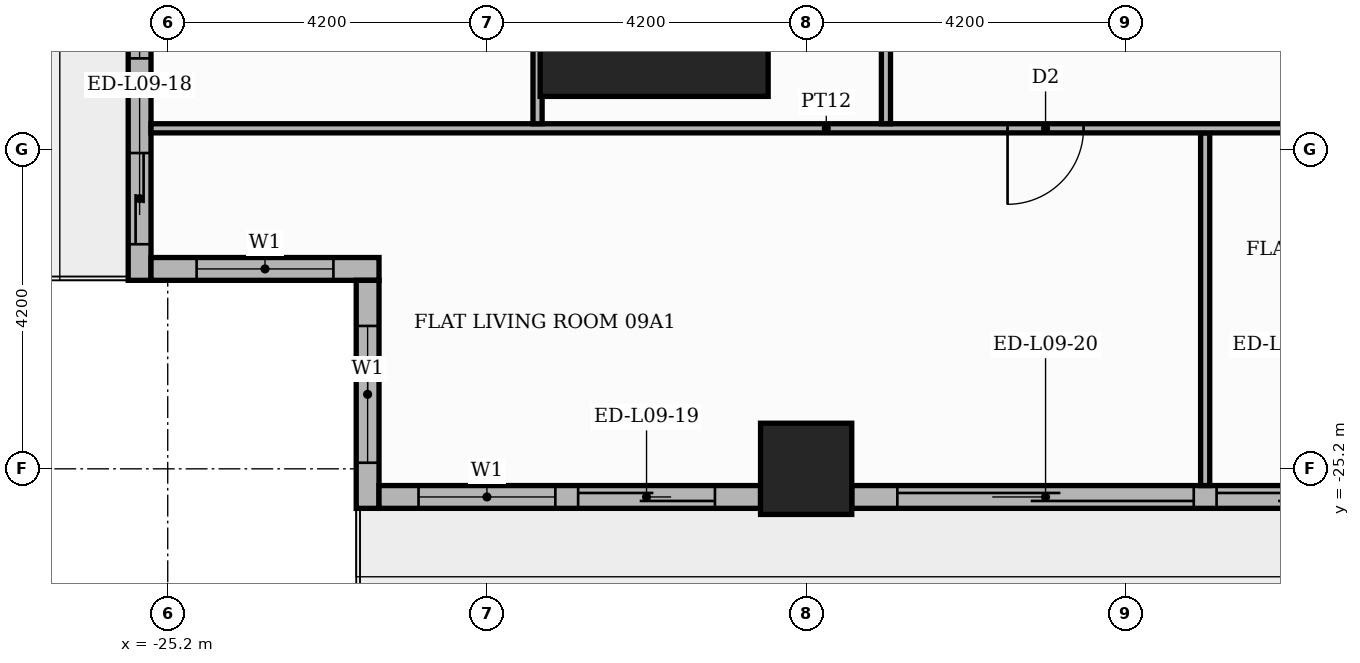
"""IFC4 building model, lengths in metres.
Left out: names, types, materials, properties, quantities, classifications, styles, units other than length and angle.
Written with IfcOpenShell. Run it as: python <this file> out.ifc"""

import sys

from ifc_helpers import new_model, si_unit, direction, frame, frame_2d, origin, origin_2d, place, context, subcontext, project, spatial, rectangle, extrude, element, fill, save


model = new_model("IFC4")
c1 = context("Model", 3, precision=1e-05, world=origin(), true_north=direction((0.0, 1.0)))
c2 = subcontext(c1, "Body", "Model", "MODEL_VIEW")
j1 = project(units=[si_unit("LENGTHUNIT", "METRE"), si_unit("PLANEANGLEUNIT", "RADIAN")], contexts=[c1])
p1 = place(None, origin())
s1 = spatial("IfcSite", under=j1, at=p1, CompositionType="ELEMENT")
p2 = place(p1, origin())
s2 = spatial("IfcBuilding", under=s1, at=p2, CompositionType="ELEMENT")
p3 = place(p2, frame((0.0, 0.0, 42.6)))
s3 = spatial("IfcBuildingStorey", under=s2, at=p3, CompositionType="ELEMENT", Elevation=42.6)
p4 = place(p3, frame((-18.8, -18.8, 0.0), z_axis=(0.0, 0.0, 1.0), x_axis=(1.0, 0.0, 0.0)))
e1 = element("IfcColumn", 1, at=p4, inside=s3, PredefinedType="COLUMN", context=c2, shape_type="SweptSolid", body=[
    extrude(rectangle(XDim=3.0, YDim=3.0, at=origin_2d()), origin(), (0.0, 0.0, 1.0), 3.9),
])
p5 = place(p3, frame((-16.8, -25.2, 0.0), z_axis=(0.0, 0.0, 1.0), x_axis=(1.0, 0.0, 0.0)))
e2 = element("IfcColumn", 2, at=p5, inside=s3, PredefinedType="COLUMN", context=c2, shape_type="SweptSolid", body=[
    extrude(rectangle(XDim=1.2, YDim=1.2, at=origin_2d()), origin(), (0.0, 0.0, 1.0), 3.9),
])
p6 = place(p3, frame((-25.57, -17.4, 0.0), z_axis=(0.0, 0.0, 1.0), x_axis=(0.0, -1.0, 0.0)))
e3 = element("IfcWall", 3, at=p6, inside=s3, PredefinedType="STANDARD", context=c2, shape_type="SweptSolid", body=[
    extrude(rectangle(XDim=5.32, YDim=0.3, at=frame_2d((2.66, 0.0))), origin(), (0.0, 0.0, 1.0), 3.48),
])
p7 = place(p6, frame((0.6, 0.0, 0.9)))
e4 = element("IfcOpeningElement", 4, at=p7, cuts=e3, PredefinedType="OPENING", context=c2, shape_type="SweptSolid", body=[
    extrude(rectangle(XDim=1.8, YDim=2.1, at=frame_2d((0.9, 1.05))), frame((0.0, 0.16, 0.0), z_axis=(0.0, -1.0, 0.0), x_axis=(1.0, 0.0, 0.0)), (0.0, 0.0, 1.0), 0.32),
])
p8 = place(p6, frame((3.645, 0.0, 0.0)))
e5 = element("IfcOpeningElement", 5, at=p8, cuts=e3, PredefinedType="OPENING", context=c2, shape_type="SweptSolid", body=[
    extrude(rectangle(XDim=1.2, YDim=2.4, at=frame_2d((0.6, 1.2))), frame((0.0, 0.16, 0.0), z_axis=(0.0, -1.0, 0.0), x_axis=(1.0, 0.0, 0.0)), (0.0, 0.0, 1.0), 0.32),
])
p9 = place(p3, frame((-25.42, -22.57, 0.0), z_axis=(0.0, 0.0, 1.0), x_axis=(1.0, 0.0, 0.0)))
e6 = element("IfcWall", 6, at=p9, inside=s3, PredefinedType="STANDARD", context=c2, shape_type="SweptSolid", body=[
    extrude(rectangle(XDim=3.0, YDim=0.3, at=frame_2d((1.5, 0.0))), origin(), (0.0, 0.0, 1.0), 3.48),
])
p10 = place(p9, frame((0.6, 0.0, 0.9)))
e7 = element("IfcOpeningElement", 7, at=p10, cuts=e6, PredefinedType="OPENING", context=c2, shape_type="SweptSolid", body=[
    extrude(rectangle(XDim=1.8, YDim=2.1, at=frame_2d((0.9, 1.05))), frame((0.0, 0.16, 0.0), z_axis=(0.0, -1.0, 0.0), x_axis=(1.0, 0.0, 0.0)), (0.0, 0.0, 1.0), 0.32),
])
p11 = place(p3, frame((-22.57, -22.72, 0.0), z_axis=(0.0, 0.0, 1.0), x_axis=(0.0, -1.0, 0.0)))
e8 = element("IfcWall", 8, at=p11, inside=s3, PredefinedType="STANDARD", context=c2, shape_type="SweptSolid", body=[
    extrude(rectangle(XDim=3.0, YDim=0.3, at=frame_2d((1.5, 0.0))), origin(), (0.0, 0.0, 1.0), 3.48),
])
p12 = place(p11, frame((0.6, 0.0, 0.9)))
e9 = element("IfcOpeningElement", 9, at=p12, cuts=e8, PredefinedType="OPENING", context=c2, shape_type="SweptSolid", body=[
    extrude(rectangle(XDim=1.8, YDim=2.1, at=frame_2d((0.9, 1.05))), frame((0.0, 0.16, 0.0), z_axis=(0.0, -1.0, 0.0), x_axis=(1.0, 0.0, 0.0)), (0.0, 0.0, 1.0), 0.32),
])
p13 = place(p3, frame((-22.42, -25.57, 0.0), z_axis=(0.0, 0.0, 1.0), x_axis=(1.0, 0.0, 0.0)))
e10 = element("IfcWall", 10, at=p13, inside=s3, PredefinedType="STANDARD", context=c2, shape_type="SweptSolid", body=[
    extrude(rectangle(XDim=5.02, YDim=0.3, at=frame_2d((2.51, 0.0))), origin(), (0.0, 0.0, 1.0), 3.48),
])
p14 = place(p13, frame((0.52, 0.0, 0.9)))
e11 = element("IfcOpeningElement", 11, at=p14, cuts=e10, PredefinedType="OPENING", context=c2, shape_type="SweptSolid", body=[
    extrude(rectangle(XDim=1.8, YDim=2.1, at=frame_2d((0.9, 1.05))), frame((0.0, 0.16, 0.0), z_axis=(0.0, -1.0, 0.0), x_axis=(1.0, 0.0, 0.0)), (0.0, 0.0, 1.0), 0.32),
])
p15 = place(p13, frame((2.62, 0.0, 0.0)))
e12 = element("IfcOpeningElement", 12, at=p15, cuts=e10, PredefinedType="OPENING", context=c2, shape_type="SweptSolid", body=[
    extrude(rectangle(XDim=1.8, YDim=2.4, at=frame_2d((0.9, 1.2))), frame((0.0, 0.16, 0.0), z_axis=(0.0, -1.0, 0.0), x_axis=(1.0, 0.0, 0.0)), (0.0, 0.0, 1.0), 0.32),
])
p16 = place(p3, frame((-16.2, -25.57, 0.0), z_axis=(0.0, 0.0, 1.0), x_axis=(1.0, 0.0, 0.0)))
e13 = element("IfcWall", 13, at=p16, inside=s3, PredefinedType="STANDARD", context=c2, shape_type="SweptSolid", body=[
    extrude(rectangle(XDim=7.2, YDim=0.3, at=frame_2d((3.6, 0.0))), origin(), (0.0, 0.0, 1.0), 3.48),
])
p17 = place(p16, frame((0.6, 0.0, 0.0)))
e14 = element("IfcOpeningElement", 14, at=p17, cuts=e13, PredefinedType="OPENING", context=c2, shape_type="SweptSolid", body=[
    extrude(rectangle(XDim=3.9, YDim=2.4, at=frame_2d((1.95, 1.2))), frame((0.0, 0.16, 0.0), z_axis=(0.0, -1.0, 0.0), x_axis=(1.0, 0.0, 0.0)), (0.0, 0.0, 1.0), 0.32),
])
p18 = place(p16, frame((4.8, 0.0, 0.0)))
e15 = element("IfcOpeningElement", 15, at=p18, cuts=e13, PredefinedType="OPENING", context=c2, shape_type="SweptSolid", body=[
    extrude(rectangle(XDim=1.8, YDim=2.4, at=frame_2d((0.9, 1.2))), frame((0.0, 0.16, 0.0), z_axis=(0.0, -1.0, 0.0), x_axis=(1.0, 0.0, 0.0)), (0.0, 0.0, 1.0), 0.32),
])
p19 = place(p3, frame((-11.55, -25.42, 0.0), z_axis=(0.0, 0.0, 1.0), x_axis=(0.0, 1.0, 0.0)))
e16 = element("IfcWall", 16, at=p19, inside=s3, PredefinedType="PARTITIONING", context=c2, shape_type="SweptSolid", body=[
    extrude(rectangle(XDim=4.64, YDim=0.12, at=frame_2d((2.32, 0.0))), origin(), (0.0, 0.0, 1.0), 3.48),
])
p20 = place(p3, frame((-25.42, -20.72, 0.0), z_axis=(0.0, 0.0, 1.0), x_axis=(1.0, 0.0, 0.0)))
e17 = element("IfcWall", 17, at=p20, inside=s3, PredefinedType="PARTITIONING", context=c2, shape_type="SweptSolid", body=[
    extrude(rectangle(XDim=17.77, YDim=0.12, at=frame_2d((8.885, 0.0))), origin(), (0.0, 0.0, 1.0), 3.48),
])
p21 = place(p20, frame((11.27, 0.0, 0.0)))
e18 = element("IfcOpeningElement", 18, at=p21, cuts=e17, PredefinedType="OPENING", context=c2, shape_type="SweptSolid", body=[
    extrude(rectangle(XDim=1.0, YDim=2.1, at=frame_2d((0.5, 1.05))), frame((0.0, 0.07, 0.0), z_axis=(0.0, -1.0, 0.0), x_axis=(1.0, 0.0, 0.0)), (0.0, 0.0, 1.0), 0.14),
])
p22 = place(p20, frame((15.47, 0.0, 0.0)))
e19 = element("IfcOpeningElement", 19, at=p22, cuts=e17, PredefinedType="OPENING", context=c2, shape_type="SweptSolid", body=[
    extrude(rectangle(XDim=1.0, YDim=2.1, at=frame_2d((0.5, 1.05))), frame((0.0, 0.07, 0.0), z_axis=(0.0, -1.0, 0.0), x_axis=(1.0, 0.0, 0.0)), (0.0, 0.0, 1.0), 0.14),
])
p23 = place(p3, frame((-20.334, -20.66, 0.0), z_axis=(0.0, 0.0, 1.0), x_axis=(0.0, 1.0, 0.0)))
e20 = element("IfcWall", 20, at=p23, inside=s3, PredefinedType="PARTITIONING", context=c2, shape_type="SweptSolid", body=[
    extrude(rectangle(XDim=6.91, YDim=0.12, at=frame_2d((3.455, 0.0))), origin(), (0.0, 0.0, 1.0), 3.48),
])
p24 = place(p23, frame((4.792, 0.0, 0.0)))
e21 = element("IfcOpeningElement", 21, at=p24, cuts=e20, PredefinedType="OPENING", context=c2, shape_type="SweptSolid", body=[
    extrude(rectangle(XDim=0.9, YDim=2.1, at=frame_2d((0.45, 1.05))), frame((0.0, 0.07, 0.0), z_axis=(0.0, -1.0, 0.0), x_axis=(1.0, 0.0, 0.0)), (0.0, 0.0, 1.0), 0.14),
])
p25 = place(p3, frame((-15.75, -20.66, 0.0), z_axis=(0.0, 0.0, 1.0), x_axis=(0.0, 1.0, 0.0)))
e22 = element("IfcWall", 22, at=p25, inside=s3, PredefinedType="PARTITIONING", context=c2, shape_type="SweptSolid", body=[
    extrude(rectangle(XDim=6.91, YDim=0.12, at=frame_2d((3.455, 0.0))), origin(), (0.0, 0.0, 1.0), 3.48),
])
p26 = place(p25, frame((2.975, 0.0, 0.0)))
e23 = element("IfcOpeningElement", 23, at=p26, cuts=e22, PredefinedType="OPENING", context=c2, shape_type="SweptSolid", body=[
    extrude(rectangle(XDim=1.0, YDim=2.1, at=frame_2d((0.5, 1.05))), frame((0.0, 0.07, 0.0), z_axis=(0.0, -1.0, 0.0), x_axis=(1.0, 0.0, 0.0)), (0.0, 0.0, 1.0), 0.14),
])
p27 = place(p7, origin())
e24 = element("IfcWindow", 24, at=p27, inside=s3, PartitioningType="SINGLE_PANEL", PredefinedType="WINDOW", context=c2, shape_type="SweptSolid", body=[
    extrude(rectangle(XDim=1.8, YDim=2.1, at=frame_2d((0.9, 1.05))), frame((0.0, 0.03, 0.0), z_axis=(0.0, -1.0, 0.0), x_axis=(1.0, 0.0, 0.0)), (0.0, 0.0, 1.0), 0.06),
])
fill(e4, e24)
p28 = place(p8, origin())
e25 = element("IfcDoor", 25, at=p28, inside=s3, OperationType="SLIDING_TO_RIGHT", PredefinedType="DOOR", context=c2, shape_type="SweptSolid", body=[
    extrude(rectangle(XDim=1.2, YDim=2.4, at=frame_2d((0.6, 1.2))), frame((0.0, 0.025, 0.0), z_axis=(0.0, -1.0, 0.0), x_axis=(1.0, 0.0, 0.0)), (0.0, 0.0, 1.0), 0.05),
])
fill(e5, e25)
p29 = place(p10, origin())
e26 = element("IfcWindow", 26, at=p29, inside=s3, PartitioningType="SINGLE_PANEL", PredefinedType="WINDOW", context=c2, shape_type="SweptSolid", body=[
    extrude(rectangle(XDim=1.8, YDim=2.1, at=frame_2d((0.9, 1.05))), frame((0.0, 0.03, 0.0), z_axis=(0.0, -1.0, 0.0), x_axis=(1.0, 0.0, 0.0)), (0.0, 0.0, 1.0), 0.06),
])
fill(e7, e26)
p30 = place(p12, origin())
e27 = element("IfcWindow", 27, at=p30, inside=s3, PartitioningType="SINGLE_PANEL", PredefinedType="WINDOW", context=c2, shape_type="SweptSolid", body=[
    extrude(rectangle(XDim=1.8, YDim=2.1, at=frame_2d((0.9, 1.05))), frame((0.0, 0.03, 0.0), z_axis=(0.0, -1.0, 0.0), x_axis=(1.0, 0.0, 0.0)), (0.0, 0.0, 1.0), 0.06),
])
fill(e9, e27)
p31 = place(p14, origin())
e28 = element("IfcWindow", 28, at=p31, inside=s3, PartitioningType="SINGLE_PANEL", PredefinedType="WINDOW", context=c2, shape_type="SweptSolid", body=[
    extrude(rectangle(XDim=1.8, YDim=2.1, at=frame_2d((0.9, 1.05))), frame((0.0, 0.03, 0.0), z_axis=(0.0, -1.0, 0.0), x_axis=(1.0, 0.0, 0.0)), (0.0, 0.0, 1.0), 0.06),
])
fill(e11, e28)
p32 = place(p15, origin())
e29 = element("IfcDoor", 29, at=p32, inside=s3, OperationType="SLIDING_TO_RIGHT", PredefinedType="DOOR", context=c2, shape_type="SweptSolid", body=[
    extrude(rectangle(XDim=1.8, YDim=2.4, at=frame_2d((0.9, 1.2))), frame((0.0, 0.025, 0.0), z_axis=(0.0, -1.0, 0.0), x_axis=(1.0, 0.0, 0.0)), (0.0, 0.0, 1.0), 0.05),
])
fill(e12, e29)
p33 = place(p17, origin())
e30 = element("IfcDoor", 30, at=p33, inside=s3, OperationType="SLIDING_TO_LEFT", PredefinedType="DOOR", context=c2, shape_type="SweptSolid", body=[
    extrude(rectangle(XDim=3.9, YDim=2.4, at=frame_2d((1.95, 1.2))), frame((0.0, 0.025, 0.0), z_axis=(0.0, -1.0, 0.0), x_axis=(1.0, 0.0, 0.0)), (0.0, 0.0, 1.0), 0.05),
])
fill(e14, e30)
p34 = place(p18, origin())
e31 = element("IfcDoor", 31, at=p34, inside=s3, OperationType="SLIDING_TO_RIGHT", PredefinedType="DOOR", context=c2, shape_type="SweptSolid", body=[
    extrude(rectangle(XDim=1.8, YDim=2.4, at=frame_2d((0.9, 1.2))), frame((0.0, 0.025, 0.0), z_axis=(0.0, -1.0, 0.0), x_axis=(1.0, 0.0, 0.0)), (0.0, 0.0, 1.0), 0.05),
])
fill(e15, e31)
p35 = place(p21, frame((1.0, 0.0, 0.0), z_axis=(0.0, 0.0, 1.0), x_axis=(-1.0, 0.0, 0.0)))
e32 = element("IfcDoor", 32, at=p35, inside=s3, OperationType="SINGLE_SWING_LEFT", PredefinedType="DOOR", context=c2, shape_type="SweptSolid", body=[
    extrude(rectangle(XDim=1.0, YDim=2.1, at=frame_2d((0.5, 1.05))), frame((0.0, 0.025, 0.0), z_axis=(0.0, -1.0, 0.0), x_axis=(1.0, 0.0, 0.0)), (0.0, 0.0, 1.0), 0.05),
])
fill(e18, e32)
save(model, sys.argv[1])
